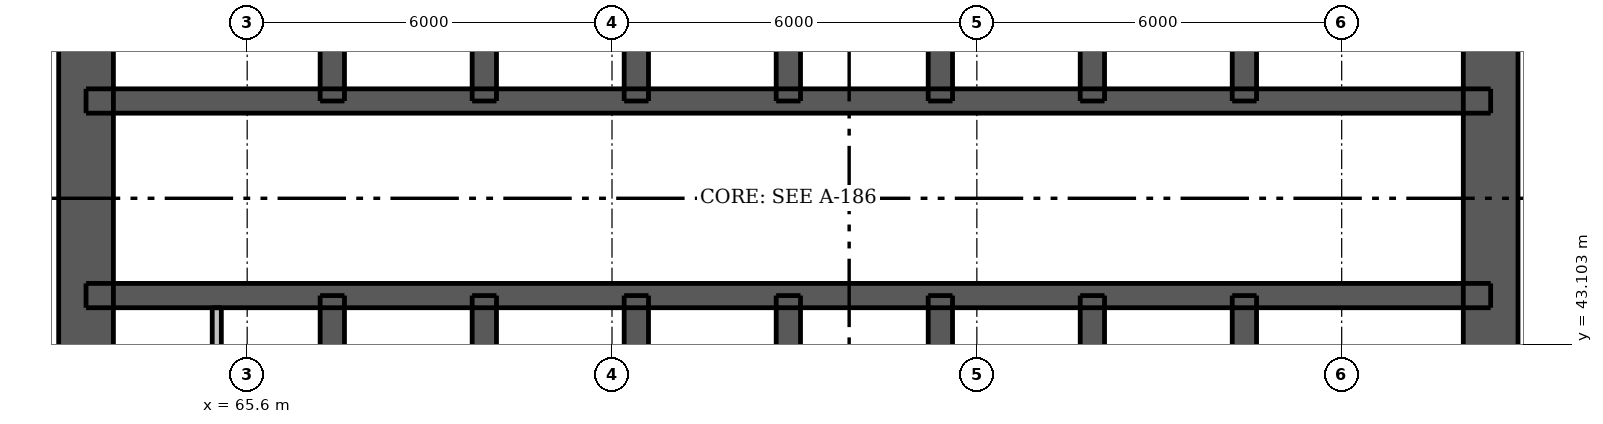
"""IFC4 building model, lengths in metres.
Left out: names, types, materials, properties, quantities, classifications, styles, units other than length and angle.
Written with IfcOpenShell. Run it as: python <this file> out.ifc"""

import sys

from ifc_helpers import new_model, si_unit, direction, frame, frame_2d, origin, place, context, subcontext, project, spatial, rectangle, extrude, element, fill, save


model = new_model("IFC4")
c1 = context("Model", 3, precision=1e-05, world=origin(), true_north=direction((0.0, 1.0)))
c2 = subcontext(c1, "Body", "Model", "MODEL_VIEW")
j1 = project(units=[si_unit("LENGTHUNIT", "METRE"), si_unit("PLANEANGLEUNIT", "RADIAN")], contexts=[c1])
p1 = place(None, origin())
s1 = spatial("IfcSite", under=j1, at=p1, CompositionType="ELEMENT")
p2 = place(p1, origin())
s2 = spatial("IfcBuilding", under=s1, at=p2, CompositionType="ELEMENT")
p3 = place(p2, frame((0.0, 0.0, 36.7)))
s3 = spatial("IfcBuildingStorey", under=s2, at=p3, CompositionType="ELEMENT", Elevation=36.7)
p4 = place(p3, frame((62.95, 33.5, 0.0), z_axis=(0.0, 0.0, 1.0), x_axis=(0.0, 1.0, 0.0)))
e1 = element("IfcWall", 1, at=p4, inside=s3, PredefinedType="SHEAR", context=c2, shape_type="SweptSolid", body=[
    extrude(rectangle(XDim=24.0, YDim=0.9, at=frame_2d((12.0, 0.0))), origin(), (0.0, 0.0, 1.0), 3.05),
])
p5 = place(p4, frame((11.2, 0.0, 0.0)))
e2 = element("IfcOpeningElement", 2, at=p5, cuts=e1, PredefinedType="OPENING", context=c2, shape_type="SweptSolid", body=[
    extrude(rectangle(XDim=1.6, YDim=2.1, at=frame_2d((0.8, 1.05))), frame((0.0, 0.46, 0.0), z_axis=(0.0, -1.0, 0.0), x_axis=(1.0, 0.0, 0.0)), (0.0, 0.0, 1.0), 0.92),
])
p6 = place(p3, frame((86.05, 33.5, 0.0), z_axis=(0.0, 0.0, 1.0), x_axis=(0.0, 1.0, 0.0)))
e3 = element("IfcWall", 3, at=p6, inside=s3, PredefinedType="SHEAR", context=c2, shape_type="SweptSolid", body=[
    extrude(rectangle(XDim=24.0, YDim=0.9, at=frame_2d((12.0, 0.0))), origin(), (0.0, 0.0, 1.0), 3.05),
])
p7 = place(p6, frame((11.2, 0.0, 0.0)))
e4 = element("IfcOpeningElement", 4, at=p7, cuts=e3, PredefinedType="OPENING", context=c2, shape_type="SweptSolid", body=[
    extrude(rectangle(XDim=1.6, YDim=2.1, at=frame_2d((0.8, 1.05))), frame((0.0, 0.46, 0.0), z_axis=(0.0, -1.0, 0.0), x_axis=(1.0, 0.0, 0.0)), (0.0, 0.0, 1.0), 0.92),
])
p8 = place(p3, frame((62.95, 43.9, 0.0), z_axis=(0.0, 0.0, 1.0), x_axis=(1.0, 0.0, 0.0)))
e5 = element("IfcWall", 5, at=p8, inside=s3, PredefinedType="SHEAR", context=c2, shape_type="SweptSolid", body=[
    extrude(rectangle(XDim=23.1, YDim=0.4, at=frame_2d((11.55, 0.0))), origin(), (0.0, 0.0, 1.0), 3.05),
])
p9 = place(p8, frame((0.85, 0.0, 0.0)))
e6 = element("IfcOpeningElement", 6, at=p9, cuts=e5, PredefinedType="OPENING", context=c2, shape_type="SweptSolid", body=[
    extrude(rectangle(XDim=0.9, YDim=2.1, at=frame_2d((0.45, 1.05))), frame((0.0, 0.21, 0.0), z_axis=(0.0, -1.0, 0.0), x_axis=(1.0, 0.0, 0.0)), (0.0, 0.0, 1.0), 0.42),
])
p10 = place(p8, frame((2.55, 0.0, 0.0)))
e7 = element("IfcOpeningElement", 7, at=p10, cuts=e5, PredefinedType="OPENING", context=c2, shape_type="SweptSolid", body=[
    extrude(rectangle(XDim=0.9, YDim=2.1, at=frame_2d((0.45, 1.05))), frame((0.0, 0.21, 0.0), z_axis=(0.0, -1.0, 0.0), x_axis=(1.0, 0.0, 0.0)), (0.0, 0.0, 1.0), 0.42),
])
p11 = place(p8, frame((20.5, 0.0, 0.0)))
e8 = element("IfcOpeningElement", 8, at=p11, cuts=e5, PredefinedType="OPENING", context=c2, shape_type="SweptSolid", body=[
    extrude(rectangle(XDim=0.9, YDim=2.1, at=frame_2d((0.45, 1.05))), frame((0.0, 0.21, 0.0), z_axis=(0.0, -1.0, 0.0), x_axis=(1.0, 0.0, 0.0)), (0.0, 0.0, 1.0), 0.42),
])
p12 = place(p8, frame((4.75, 0.0, 0.0)))
e9 = element("IfcOpeningElement", 9, at=p12, cuts=e5, PredefinedType="OPENING", context=c2, shape_type="SweptSolid", body=[
    extrude(rectangle(XDim=1.1, YDim=2.1, at=frame_2d((0.55, 1.05))), frame((0.0, 0.21, 0.0), z_axis=(0.0, -1.0, 0.0), x_axis=(1.0, 0.0, 0.0)), (0.0, 0.0, 1.0), 0.42),
])
p13 = place(p8, frame((7.25, 0.0, 0.0)))
e10 = element("IfcOpeningElement", 10, at=p13, cuts=e5, PredefinedType="OPENING", context=c2, shape_type="SweptSolid", body=[
    extrude(rectangle(XDim=1.1, YDim=2.1, at=frame_2d((0.55, 1.05))), frame((0.0, 0.21, 0.0), z_axis=(0.0, -1.0, 0.0), x_axis=(1.0, 0.0, 0.0)), (0.0, 0.0, 1.0), 0.42),
])
p14 = place(p8, frame((9.75, 0.0, 0.0)))
e11 = element("IfcOpeningElement", 11, at=p14, cuts=e5, PredefinedType="OPENING", context=c2, shape_type="SweptSolid", body=[
    extrude(rectangle(XDim=1.1, YDim=2.1, at=frame_2d((0.55, 1.05))), frame((0.0, 0.21, 0.0), z_axis=(0.0, -1.0, 0.0), x_axis=(1.0, 0.0, 0.0)), (0.0, 0.0, 1.0), 0.42),
])
p15 = place(p8, frame((12.25, 0.0, 0.0)))
e12 = element("IfcOpeningElement", 12, at=p15, cuts=e5, PredefinedType="OPENING", context=c2, shape_type="SweptSolid", body=[
    extrude(rectangle(XDim=1.1, YDim=2.1, at=frame_2d((0.55, 1.05))), frame((0.0, 0.21, 0.0), z_axis=(0.0, -1.0, 0.0), x_axis=(1.0, 0.0, 0.0)), (0.0, 0.0, 1.0), 0.42),
])
p16 = place(p8, frame((14.75, 0.0, 0.0)))
e13 = element("IfcOpeningElement", 13, at=p16, cuts=e5, PredefinedType="OPENING", context=c2, shape_type="SweptSolid", body=[
    extrude(rectangle(XDim=1.1, YDim=2.1, at=frame_2d((0.55, 1.05))), frame((0.0, 0.21, 0.0), z_axis=(0.0, -1.0, 0.0), x_axis=(1.0, 0.0, 0.0)), (0.0, 0.0, 1.0), 0.42),
])
p17 = place(p8, frame((17.25, 0.0, 0.0)))
e14 = element("IfcOpeningElement", 14, at=p17, cuts=e5, PredefinedType="OPENING", context=c2, shape_type="SweptSolid", body=[
    extrude(rectangle(XDim=1.1, YDim=2.1, at=frame_2d((0.55, 1.05))), frame((0.0, 0.21, 0.0), z_axis=(0.0, -1.0, 0.0), x_axis=(1.0, 0.0, 0.0)), (0.0, 0.0, 1.0), 0.42),
])
p18 = place(p3, frame((62.95, 47.1, 0.0), z_axis=(0.0, 0.0, 1.0), x_axis=(1.0, 0.0, 0.0)))
e15 = element("IfcWall", 15, at=p18, inside=s3, PredefinedType="SHEAR", context=c2, shape_type="SweptSolid", body=[
    extrude(rectangle(XDim=23.1, YDim=0.4, at=frame_2d((11.55, 0.0))), origin(), (0.0, 0.0, 1.0), 3.05),
])
p19 = place(p18, frame((1.7, 0.0, 0.0)))
e16 = element("IfcOpeningElement", 16, at=p19, cuts=e15, PredefinedType="OPENING", context=c2, shape_type="SweptSolid", body=[
    extrude(rectangle(XDim=0.9, YDim=2.1, at=frame_2d((0.45, 1.05))), frame((0.0, 0.21, 0.0), z_axis=(0.0, -1.0, 0.0), x_axis=(1.0, 0.0, 0.0)), (0.0, 0.0, 1.0), 0.42),
])
p20 = place(p18, frame((20.5, 0.0, 0.0)))
e17 = element("IfcOpeningElement", 17, at=p20, cuts=e15, PredefinedType="OPENING", context=c2, shape_type="SweptSolid", body=[
    extrude(rectangle(XDim=0.9, YDim=2.1, at=frame_2d((0.45, 1.05))), frame((0.0, 0.21, 0.0), z_axis=(0.0, -1.0, 0.0), x_axis=(1.0, 0.0, 0.0)), (0.0, 0.0, 1.0), 0.42),
])
p21 = place(p3, frame((67.0, 33.95, 0.0), z_axis=(0.0, 0.0, 1.0), x_axis=(0.0, 1.0, 0.0)))
e18 = element("IfcWall", 18, at=p21, inside=s3, PredefinedType="SHEAR", context=c2, shape_type="SweptSolid", body=[
    extrude(rectangle(XDim=9.95, YDim=0.4, at=frame_2d((4.975, 0.0))), origin(), (0.0, 0.0, 1.0), 3.05),
])
p22 = place(p21, frame((0.65, 0.0, 0.0)))
e19 = element("IfcOpeningElement", 19, at=p22, cuts=e18, PredefinedType="OPENING", context=c2, shape_type="SweptSolid", body=[
    extrude(rectangle(XDim=1.1, YDim=2.1, at=frame_2d((0.55, 1.05))), frame((0.0, 0.21, 0.0), z_axis=(0.0, -1.0, 0.0), x_axis=(1.0, 0.0, 0.0)), (0.0, 0.0, 1.0), 0.42),
])
for number, where, z_axis, x_axis in (
    (20, (67.0, 47.1, 0.0), (0.0, 0.0, 1.0), (0.0, 1.0, 0.0)),
    (21, (82.0, 33.95, 0.0), (0.0, 0.0, 1.0), (0.0, 1.0, 0.0)),
    (22, (82.0, 47.1, 0.0), (0.0, 0.0, 1.0), (0.0, 1.0, 0.0)),
):
    element("IfcWall", number, at=place(p3, frame(where, z_axis=z_axis, x_axis=x_axis)), inside=s3, PredefinedType="SHEAR", context=c2, shape_type="SweptSolid", body=[
        extrude(rectangle(XDim=9.95, YDim=0.4, at=frame_2d((4.975, 0.0))), origin(), (0.0, 0.0, 1.0), 3.05),
    ])
for number, where, z_axis, x_axis in (
    (23, (69.5, 41.0, 0.0), (0.0, 0.0, 1.0), (0.0, 1.0, 0.0)),
    (24, (69.5, 47.1, 0.0), (0.0, 0.0, 1.0), (0.0, 1.0, 0.0)),
    (25, (72.0, 41.0, 0.0), (0.0, 0.0, 1.0), (0.0, 1.0, 0.0)),
    (26, (72.0, 47.1, 0.0), (0.0, 0.0, 1.0), (0.0, 1.0, 0.0)),
    (27, (74.5, 41.0, 0.0), (0.0, 0.0, 1.0), (0.0, 1.0, 0.0)),
    (28, (74.5, 47.1, 0.0), (0.0, 0.0, 1.0), (0.0, 1.0, 0.0)),
    (29, (77.0, 41.0, 0.0), (0.0, 0.0, 1.0), (0.0, 1.0, 0.0)),
    (30, (77.0, 47.1, 0.0), (0.0, 0.0, 1.0), (0.0, 1.0, 0.0)),
    (31, (79.5, 41.0, 0.0), (0.0, 0.0, 1.0), (0.0, 1.0, 0.0)),
    (32, (79.5, 47.1, 0.0), (0.0, 0.0, 1.0), (0.0, 1.0, 0.0)),
):
    element("IfcWall", number, at=place(p3, frame(where, z_axis=z_axis, x_axis=x_axis)), inside=s3, PredefinedType="SHEAR", context=c2, shape_type="SweptSolid", body=[
        extrude(rectangle(XDim=2.9, YDim=0.4, at=frame_2d((1.45, 0.0))), origin(), (0.0, 0.0, 1.0), 3.05),
    ])
p23 = place(p3, frame((65.1, 41.2, 0.0), z_axis=(0.0, 0.0, 1.0), x_axis=(0.0, 1.0, 0.0)))
e33 = element("IfcWall", 33, at=p23, inside=s3, PredefinedType="PLUMBINGWALL", context=c2, shape_type="SweptSolid", body=[
    extrude(rectangle(XDim=2.5, YDim=0.15, at=frame_2d((1.25, 0.0))), origin(), (0.0, 0.0, 1.0), 3.05),
])
p24 = place(p5, origin())
e34 = element("IfcDoor", 34, at=p24, inside=s3, OperationType="DOUBLE_DOOR_SINGLE_SWING", PredefinedType="DOOR", context=c2, shape_type="SweptSolid", body=[
    extrude(rectangle(XDim=1.6, YDim=2.1, at=frame_2d((0.8, 1.05))), frame((0.0, -0.388, 0.0), z_axis=(0.0, -1.0, 0.0), x_axis=(1.0, 0.0, 0.0)), (0.0, 0.0, 1.0), 0.05),
])
fill(e2, e34)
p25 = place(p7, origin())
e35 = element("IfcDoor", 35, at=p25, inside=s3, OperationType="DOUBLE_DOOR_SINGLE_SWING", PredefinedType="DOOR", context=c2, shape_type="SweptSolid", body=[
    extrude(rectangle(XDim=1.6, YDim=2.1, at=frame_2d((0.8, 1.05))), frame((0.0, 0.438, 0.0), z_axis=(0.0, -1.0, 0.0), x_axis=(1.0, 0.0, 0.0)), (0.0, 0.0, 1.0), 0.05),
])
fill(e4, e35)
p26 = place(p9, origin())
e36 = element("IfcDoor", 36, at=p26, inside=s3, OperationType="SINGLE_SWING_LEFT", PredefinedType="DOOR", context=c2, shape_type="SweptSolid", body=[
    extrude(rectangle(XDim=0.9, YDim=2.1, at=frame_2d((0.45, 1.05))), frame((0.0, -0.138, 0.0), z_axis=(0.0, -1.0, 0.0), x_axis=(1.0, 0.0, 0.0)), (0.0, 0.0, 1.0), 0.05),
])
fill(e6, e36)
p27 = place(p10, origin())
e37 = element("IfcDoor", 37, at=p27, inside=s3, OperationType="SINGLE_SWING_RIGHT", PredefinedType="DOOR", context=c2, shape_type="SweptSolid", body=[
    extrude(rectangle(XDim=0.9, YDim=2.1, at=frame_2d((0.45, 1.05))), frame((0.0, -0.138, 0.0), z_axis=(0.0, -1.0, 0.0), x_axis=(1.0, 0.0, 0.0)), (0.0, 0.0, 1.0), 0.05),
])
fill(e7, e37)
p28 = place(p11, origin())
e38 = element("IfcDoor", 38, at=p28, inside=s3, OperationType="SINGLE_SWING_LEFT", PredefinedType="DOOR", context=c2, shape_type="SweptSolid", body=[
    extrude(rectangle(XDim=0.9, YDim=2.1, at=frame_2d((0.45, 1.05))), frame((0.0, -0.138, 0.0), z_axis=(0.0, -1.0, 0.0), x_axis=(1.0, 0.0, 0.0)), (0.0, 0.0, 1.0), 0.05),
])
fill(e8, e38)
p29 = place(p19, origin())
e39 = element("IfcDoor", 39, at=p29, inside=s3, OperationType="SINGLE_SWING_LEFT", PredefinedType="DOOR", context=c2, shape_type="SweptSolid", body=[
    extrude(rectangle(XDim=0.9, YDim=2.1, at=frame_2d((0.45, 1.05))), frame((0.0, 0.188, 0.0), z_axis=(0.0, -1.0, 0.0), x_axis=(1.0, 0.0, 0.0)), (0.0, 0.0, 1.0), 0.05),
])
fill(e16, e39)
p30 = place(p20, origin())
e40 = element("IfcDoor", 40, at=p30, inside=s3, OperationType="SINGLE_SWING_LEFT", PredefinedType="DOOR", context=c2, shape_type="SweptSolid", body=[
    extrude(rectangle(XDim=0.9, YDim=2.1, at=frame_2d((0.45, 1.05))), frame((0.0, 0.188, 0.0), z_axis=(0.0, -1.0, 0.0), x_axis=(1.0, 0.0, 0.0)), (0.0, 0.0, 1.0), 0.05),
])
fill(e17, e40)
p31 = place(p12, origin())
e41 = element("IfcDoor", 41, at=p31, inside=s3, OperationType="DOUBLE_DOOR_SLIDING", PredefinedType="DOOR", context=c2, shape_type="SweptSolid", body=[
    extrude(rectangle(XDim=1.1, YDim=2.1, at=frame_2d((0.55, 1.05))), frame((0.0, 0.025, 0.0), z_axis=(0.0, -1.0, 0.0), x_axis=(1.0, 0.0, 0.0)), (0.0, 0.0, 1.0), 0.05),
])
fill(e9, e41)
p32 = place(p13, origin())
e42 = element("IfcDoor", 42, at=p32, inside=s3, OperationType="DOUBLE_DOOR_SLIDING", PredefinedType="DOOR", context=c2, shape_type="SweptSolid", body=[
    extrude(rectangle(XDim=1.1, YDim=2.1, at=frame_2d((0.55, 1.05))), frame((0.0, 0.025, 0.0), z_axis=(0.0, -1.0, 0.0), x_axis=(1.0, 0.0, 0.0)), (0.0, 0.0, 1.0), 0.05),
])
fill(e10, e42)
p33 = place(p14, origin())
e43 = element("IfcDoor", 43, at=p33, inside=s3, OperationType="DOUBLE_DOOR_SLIDING", PredefinedType="DOOR", context=c2, shape_type="SweptSolid", body=[
    extrude(rectangle(XDim=1.1, YDim=2.1, at=frame_2d((0.55, 1.05))), frame((0.0, 0.025, 0.0), z_axis=(0.0, -1.0, 0.0), x_axis=(1.0, 0.0, 0.0)), (0.0, 0.0, 1.0), 0.05),
])
fill(e11, e43)
p34 = place(p15, origin())
e44 = element("IfcDoor", 44, at=p34, inside=s3, OperationType="DOUBLE_DOOR_SLIDING", PredefinedType="DOOR", context=c2, shape_type="SweptSolid", body=[
    extrude(rectangle(XDim=1.1, YDim=2.1, at=frame_2d((0.55, 1.05))), frame((0.0, 0.025, 0.0), z_axis=(0.0, -1.0, 0.0), x_axis=(1.0, 0.0, 0.0)), (0.0, 0.0, 1.0), 0.05),
])
fill(e12, e44)
p35 = place(p16, origin())
e45 = element("IfcDoor", 45, at=p35, inside=s3, OperationType="DOUBLE_DOOR_SLIDING", PredefinedType="DOOR", context=c2, shape_type="SweptSolid", body=[
    extrude(rectangle(XDim=1.1, YDim=2.1, at=frame_2d((0.55, 1.05))), frame((0.0, 0.025, 0.0), z_axis=(0.0, -1.0, 0.0), x_axis=(1.0, 0.0, 0.0)), (0.0, 0.0, 1.0), 0.05),
])
fill(e13, e45)
p36 = place(p17, origin())
e46 = element("IfcDoor", 46, at=p36, inside=s3, OperationType="DOUBLE_DOOR_SLIDING", PredefinedType="DOOR", context=c2, shape_type="SweptSolid", body=[
    extrude(rectangle(XDim=1.1, YDim=2.1, at=frame_2d((0.55, 1.05))), frame((0.0, 0.025, 0.0), z_axis=(0.0, -1.0, 0.0), x_axis=(1.0, 0.0, 0.0)), (0.0, 0.0, 1.0), 0.05),
])
fill(e14, e46)
save(model, sys.argv[1])
